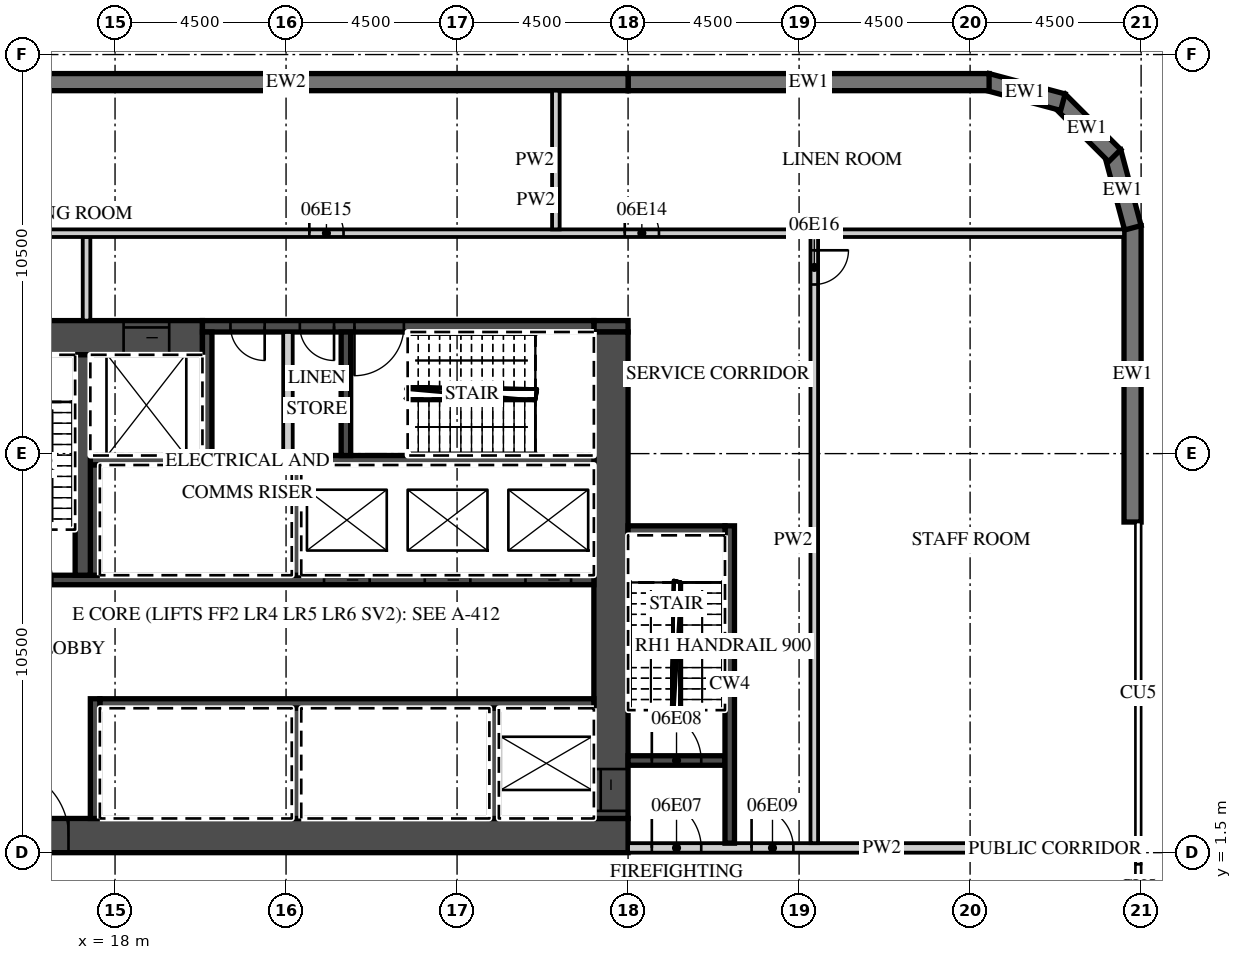
"""IFC4 building model, lengths in metres.
Left out: names, types, materials, properties, quantities, classifications, styles, units other than length and angle.
Written with IfcOpenShell. Run it as: python <this file> out.ifc"""

import sys

from ifc_helpers import new_model, si_unit, direction, frame, frame_2d, origin, place, context, subcontext, project, spatial, polyline, rectangle, outline, extrude, element, fill, save


model = new_model("IFC4")
c1 = context("Model", 3, precision=1e-05, world=origin(), true_north=direction((0.0, 1.0)))
c2 = subcontext(c1, "Body", "Model", "MODEL_VIEW")
j1 = project(units=[si_unit("LENGTHUNIT", "METRE"), si_unit("PLANEANGLEUNIT", "RADIAN")], contexts=[c1])
p1 = place(None, origin())
s1 = spatial("IfcSite", under=j1, at=p1, CompositionType="ELEMENT")
p2 = place(p1, origin())
s2 = spatial("IfcBuilding", under=s1, at=p2, CompositionType="ELEMENT")
p3 = place(p2, frame((0.0, 0.0, 38.0)))
s3 = spatial("IfcBuildingStorey", under=s2, at=p3, CompositionType="ELEMENT", Elevation=38.0)
p4 = place(p3, frame((44.775, 10.2, 0.0), z_axis=(0.0, 0.0, 1.0), x_axis=(0.0, 1.0, 0.0)))
e1 = element("IfcWall", 1, at=p4, inside=s3, PredefinedType="SOLIDWALL", context=c2, shape_type="SweptSolid", body=[
    extrude(rectangle(XDim=7.8, YDim=0.45, at=frame_2d((3.9, 0.0))), origin(), (0.0, 0.0, 1.0), 8.7),
])
p5 = place(p3, frame((44.783, 17.942, 0.0), z_axis=(0.0, 0.0, 1.0), x_axis=(-0.25881466832, 0.965926999034, 0.0)))
e2 = element("IfcWall", 2, at=p5, inside=s3, PredefinedType="SOLIDWALL", context=c2, shape_type="SweptSolid", body=[
    extrude(outline(polyline([(0.0, -0.225), (2.071, -0.225), (1.95, 0.225), (0.121, 0.225), (0.0, -0.225)])), origin(), (0.0, 0.0, 1.0), 8.7),
])
p6 = place(p3, frame((44.305, 19.841, 0.0), z_axis=(0.0, 0.0, 1.0), x_axis=(-0.707106781187, 0.707106781187, 0.0)))
e3 = element("IfcWall", 3, at=p6, inside=s3, PredefinedType="SOLIDWALL", context=c2, shape_type="SweptSolid", body=[
    extrude(outline(polyline([(0.0, -0.225), (2.071, -0.225), (1.95, 0.225), (0.121, 0.225), (0.0, -0.225)])), origin(), (0.0, 0.0, 1.0), 8.7),
])
p7 = place(p3, frame((42.942, 21.247, 0.0), z_axis=(0.0, 0.0, 1.0), x_axis=(-0.965926999034, 0.25881466832, 0.0)))
e4 = element("IfcWall", 4, at=p7, inside=s3, PredefinedType="SOLIDWALL", context=c2, shape_type="SweptSolid", body=[
    extrude(outline(polyline([(-0.0, -0.225), (2.07, -0.225), (1.95, 0.225), (0.12, 0.225), (-0.0, -0.225)])), origin(), (0.0, 0.0, 1.0), 8.7),
])
p8 = place(p3, frame((41.0, 21.775, 0.0), z_axis=(0.0, 0.0, 1.0), x_axis=(-1.0, 0.0, 0.0)))
e5 = element("IfcWall", 5, at=p8, inside=s3, PredefinedType="SOLIDWALL", context=c2, shape_type="SweptSolid", body=[
    extrude(rectangle(XDim=9.5, YDim=0.45, at=frame_2d((4.75, 0.0))), origin(), (0.0, 0.0, 1.0), 8.7),
])
p9 = place(p3, frame((31.5, 21.775, 0.0), z_axis=(0.0, 0.0, 1.0), x_axis=(-1.0, 0.0, 0.0)))
e6 = element("IfcWall", 6, at=p9, inside=s3, PredefinedType="SOLIDWALL", context=c2, shape_type="SweptSolid", body=[
    extrude(rectangle(XDim=18.0, YDim=0.45, at=frame_2d((9.0, 0.0))), origin(), (0.0, 0.0, 1.0), 8.7),
])
p10 = place(p3, frame((13.5, 1.95, 0.0), z_axis=(0.0, 0.0, 1.0), x_axis=(1.0, 0.0, 0.0)))
e7 = element("IfcWall", 7, at=p10, inside=s3, PredefinedType="SHEAR", context=c2, shape_type="SweptSolid", body=[
    extrude(rectangle(XDim=18.0, YDim=0.9, at=frame_2d((9.0, 0.0))), origin(), (0.0, 0.0, 1.0), 8.7),
])
p11 = place(p10, frame((1.475, 0.0, 0.0)))
e8 = element("IfcOpeningElement", 8, at=p11, cuts=e7, PredefinedType="OPENING", context=c2, shape_type="SweptSolid", body=[
    extrude(rectangle(XDim=1.8, YDim=2.1, at=frame_2d((0.9, 1.05))), frame((0.0, 0.46, 0.0), z_axis=(0.0, -1.0, 0.0), x_axis=(1.0, 0.0, 0.0)), (0.0, 0.0, 1.0), 0.92),
])
p12 = place(p3, frame((13.5, 15.05, 0.0), z_axis=(0.0, 0.0, 1.0), x_axis=(1.0, 0.0, 0.0)))
e9 = element("IfcWall", 9, at=p12, inside=s3, PredefinedType="SHEAR", context=c2, shape_type="SweptSolid", body=[
    extrude(rectangle(XDim=6.8, YDim=0.9, at=frame_2d((3.4, 0.0))), origin(), (0.0, 0.0, 1.0), 8.7),
])
p13 = place(p12, frame((4.725, 0.0, 0.0)))
e10 = element("IfcOpeningElement", 10, at=p13, cuts=e9, PredefinedType="OPENING", context=c2, shape_type="SweptSolid", body=[
    extrude(rectangle(XDim=1.2, YDim=2.1, at=frame_2d((0.6, 1.05))), frame((0.0, 0.46, 0.0), z_axis=(0.0, -1.0, 0.0), x_axis=(1.0, 0.0, 0.0)), (0.0, 0.0, 1.0), 0.92),
])
p14 = place(p3, frame((30.6, 15.35, 0.0), z_axis=(0.0, 0.0, 1.0), x_axis=(1.0, 0.0, 0.0)))
e11 = element("IfcWall", 11, at=p14, inside=s3, PredefinedType="SHEAR", context=c2, shape_type="SweptSolid", body=[
    extrude(rectangle(XDim=0.9, YDim=0.3, at=frame_2d((0.45, 0.0))), origin(), (0.0, 0.0, 1.0), 8.7),
])
p15 = place(p3, frame((20.3, 15.35, 0.0), z_axis=(0.0, 0.0, 1.0), x_axis=(1.0, 0.0, 0.0)))
e12 = element("IfcWall", 12, at=p15, inside=s3, PredefinedType="SHEAR", context=c2, shape_type="SweptSolid", body=[
    extrude(rectangle(XDim=10.3, YDim=0.3, at=frame_2d((5.15, 0.0))), origin(), (0.0, 0.0, 1.0), 8.7),
])
p16 = place(p15, frame((4.0, 0.0, 0.0)))
e13 = element("IfcOpeningElement", 13, at=p16, cuts=e12, PredefinedType="OPENING", context=c2, shape_type="SweptSolid", body=[
    extrude(rectangle(XDim=1.3, YDim=2.1, at=frame_2d((0.65, 1.05))), frame((0.0, 0.16, 0.0), z_axis=(0.0, -1.0, 0.0), x_axis=(1.0, 0.0, 0.0)), (0.0, 0.0, 1.0), 0.32),
])
p17 = place(p15, frame((2.562, 0.0, 0.0)))
e14 = element("IfcOpeningElement", 14, at=p17, cuts=e12, PredefinedType="OPENING", context=c2, shape_type="SweptSolid", body=[
    extrude(rectangle(XDim=0.9, YDim=2.1, at=frame_2d((0.45, 1.05))), frame((0.0, 0.16, 0.0), z_axis=(0.0, -1.0, 0.0), x_axis=(1.0, 0.0, 0.0)), (0.0, 0.0, 1.0), 0.32),
])
p18 = place(p15, frame((0.738, 0.0, 0.0)))
e15 = element("IfcOpeningElement", 15, at=p18, cuts=e12, PredefinedType="OPENING", context=c2, shape_type="SweptSolid", body=[
    extrude(rectangle(XDim=0.9, YDim=2.1, at=frame_2d((0.45, 1.05))), frame((0.0, 0.16, 0.0), z_axis=(0.0, -1.0, 0.0), x_axis=(1.0, 0.0, 0.0)), (0.0, 0.0, 1.0), 0.32),
])
p19 = place(p3, frame((31.05, 2.4, 0.0), z_axis=(0.0, 0.0, 1.0), x_axis=(0.0, 1.0, 0.0)))
e16 = element("IfcWall", 16, at=p19, inside=s3, PredefinedType="SHEAR", context=c2, shape_type="SweptSolid", body=[
    extrude(rectangle(XDim=12.8, YDim=0.9, at=frame_2d((6.4, 0.0))), origin(), (0.0, 0.0, 1.0), 8.7),
])
p20 = place(p19, frame((0.2, 0.0, 0.0)))
e17 = element("IfcOpeningElement", 17, at=p20, cuts=e16, PredefinedType="OPENING", context=c2, shape_type="SweptSolid", body=[
    extrude(rectangle(XDim=1.1, YDim=2.1, at=frame_2d((0.55, 1.05))), frame((0.0, 0.46, 0.0), z_axis=(0.0, -1.0, 0.0), x_axis=(1.0, 0.0, 0.0)), (0.0, 0.0, 1.0), 0.92),
])
p21 = place(p3, frame((17.6, 5.425, 0.0), z_axis=(0.0, 0.0, 1.0), x_axis=(1.0, 0.0, 0.0)))
e18 = element("IfcWall", 18, at=p21, inside=s3, PredefinedType="SHEAR", context=c2, shape_type="SweptSolid", body=[
    extrude(rectangle(XDim=13.0, YDim=0.25, at=frame_2d((6.5, 0.0))), origin(), (0.0, 0.0, 1.0), 8.7),
])
p22 = place(p3, frame((17.475, 2.4, 0.0), z_axis=(0.0, 0.0, 1.0), x_axis=(0.0, 1.0, 0.0)))
e19 = element("IfcWall", 19, at=p22, inside=s3, PredefinedType="SHEAR", context=c2, shape_type="SweptSolid", body=[
    extrude(rectangle(XDim=3.15, YDim=0.25, at=frame_2d((1.575, 0.0))), origin(), (0.0, 0.0, 1.0), 8.7),
])
for number, where, z_axis, x_axis in (
    (20, (27.975, 2.4, 0.0), (0.0, 0.0, 1.0), (0.0, 1.0, 0.0)),
    (21, (22.775, 2.4, 0.0), (0.0, 0.0, 1.0), (0.0, 1.0, 0.0)),
):
    element("IfcWall", number, at=place(p3, frame(where, z_axis=z_axis, x_axis=x_axis)), inside=s3, PredefinedType="SHEAR", context=c2, shape_type="SweptSolid", body=[
        extrude(rectangle(XDim=2.9, YDim=0.25, at=frame_2d((1.45, 0.0))), origin(), (0.0, 0.0, 1.0), 8.7),
    ])
p23 = place(p3, frame((14.4, 8.675, 0.0), z_axis=(0.0, 0.0, 1.0), x_axis=(1.0, 0.0, 0.0)))
e22 = element("IfcWall", 22, at=p23, inside=s3, PredefinedType="SHEAR", context=c2, shape_type="SweptSolid", body=[
    extrude(rectangle(XDim=16.2, YDim=0.25, at=frame_2d((8.1, 0.0))), origin(), (0.0, 0.0, 1.0), 8.7),
])
p24 = place(p23, frame((14.4, 0.0, 0.0)))
e23 = element("IfcOpeningElement", 23, at=p24, cuts=e22, PredefinedType="OPENING", context=c2, shape_type="SweptSolid", body=[
    extrude(rectangle(XDim=1.2, YDim=2.1, at=frame_2d((0.6, 1.05))), frame((0.0, 0.135, 0.0), z_axis=(0.0, -1.0, 0.0), x_axis=(1.0, 0.0, 0.0)), (0.0, 0.0, 1.0), 0.27),
])
p25 = place(p23, frame((11.75, 0.0, 0.0)))
e24 = element("IfcOpeningElement", 24, at=p25, cuts=e22, PredefinedType="OPENING", context=c2, shape_type="SweptSolid", body=[
    extrude(rectangle(XDim=1.2, YDim=2.1, at=frame_2d((0.6, 1.05))), frame((0.0, 0.135, 0.0), z_axis=(0.0, -1.0, 0.0), x_axis=(1.0, 0.0, 0.0)), (0.0, 0.0, 1.0), 0.27),
])
p26 = place(p23, frame((9.1, 0.0, 0.0)))
e25 = element("IfcOpeningElement", 25, at=p26, cuts=e22, PredefinedType="OPENING", context=c2, shape_type="SweptSolid", body=[
    extrude(rectangle(XDim=1.2, YDim=2.1, at=frame_2d((0.6, 1.05))), frame((0.0, 0.135, 0.0), z_axis=(0.0, -1.0, 0.0), x_axis=(1.0, 0.0, 0.0)), (0.0, 0.0, 1.0), 0.27),
])
p27 = place(p23, frame((0.65, 0.0, 0.0)))
e26 = element("IfcOpeningElement", 26, at=p27, cuts=e22, PredefinedType="OPENING", context=c2, shape_type="SweptSolid", body=[
    extrude(rectangle(XDim=1.3, YDim=2.1, at=frame_2d((0.65, 1.05))), frame((0.0, 0.135, 0.0), z_axis=(0.0, -1.0, 0.0), x_axis=(1.0, 0.0, 0.0)), (0.0, 0.0, 1.0), 0.27),
])
p28 = place(p3, frame((17.35, 11.825, 0.0), z_axis=(0.0, 0.0, 1.0), x_axis=(1.0, 0.0, 0.0)))
e27 = element("IfcWall", 27, at=p28, inside=s3, PredefinedType="SHEAR", context=c2, shape_type="SweptSolid", body=[
    extrude(rectangle(XDim=13.25, YDim=0.25, at=frame_2d((6.625, 0.0))), origin(), (0.0, 0.0, 1.0), 8.7),
])
for number, where, z_axis, x_axis in (
    (28, (17.475, 8.8, 0.0), (0.0, 0.0, 1.0), (0.0, 1.0, 0.0)),
    (29, (22.775, 8.8, 0.0), (0.0, 0.0, 1.0), (0.0, 1.0, 0.0)),
):
    element("IfcWall", number, at=place(p3, frame(where, z_axis=z_axis, x_axis=x_axis)), inside=s3, PredefinedType="SHEAR", context=c2, shape_type="SweptSolid", body=[
        extrude(rectangle(XDim=2.9, YDim=0.25, at=frame_2d((1.45, 0.0))), origin(), (0.0, 0.0, 1.0), 8.7),
    ])
p29 = place(p3, frame((17.15, 8.8, 0.0), z_axis=(0.0, 0.0, 1.0), x_axis=(0.0, 1.0, 0.0)))
e30 = element("IfcWall", 30, at=p29, inside=s3, PredefinedType="SHEAR", context=c2, shape_type="SweptSolid", body=[
    extrude(rectangle(XDim=5.8, YDim=0.4, at=frame_2d((2.9, 0.0))), origin(), (0.0, 0.0, 1.0), 8.7),
])
for number, where, z_axis, x_axis in (
    (31, (20.425, 11.95, 0.0), (0.0, 0.0, 1.0), (0.0, 1.0, 0.0)),
    (32, (24.075, 11.95, 0.0), (0.0, 0.0, 1.0), (0.0, 1.0, 0.0)),
):
    element("IfcWall", number, at=place(p3, frame(where, z_axis=z_axis, x_axis=x_axis)), inside=s3, PredefinedType="SHEAR", context=c2, shape_type="SweptSolid", body=[
        extrude(rectangle(XDim=3.25, YDim=0.25, at=frame_2d((1.625, 0.0))), origin(), (0.0, 0.0, 1.0), 8.7),
    ])
p30 = place(p3, frame((22.55, 11.95, 0.0), z_axis=(0.0, 0.0, 1.0), x_axis=(0.0, 1.0, 0.0)))
e33 = element("IfcWall", 33, at=p30, inside=s3, PredefinedType="PARTITIONING", context=c2, shape_type="SweptSolid", body=[
    extrude(rectangle(XDim=3.25, YDim=0.25, at=frame_2d((1.625, 0.0))), origin(), (0.0, 0.0, 1.0), 8.7),
])
p31 = place(p3, frame((31.5, 1.625, 0.0), z_axis=(0.0, 0.0, 1.0), x_axis=(1.0, 0.0, 0.0)))
e34 = element("IfcWall", 34, at=p31, inside=s3, PredefinedType="PARTITIONING", context=c2, shape_type="SweptSolid", body=[
    extrude(rectangle(XDim=13.35, YDim=0.25, at=frame_2d((6.675, 0.0))), origin(), (0.0, 0.0, 1.0), 8.7),
])
p32 = place(p31, frame((0.625, 0.0, 0.0)))
e35 = element("IfcOpeningElement", 35, at=p32, cuts=e34, PredefinedType="OPENING", context=c2, shape_type="SweptSolid", body=[
    extrude(rectangle(XDim=1.3, YDim=2.1, at=frame_2d((0.65, 1.05))), frame((0.0, 0.135, 0.0), z_axis=(0.0, -1.0, 0.0), x_axis=(1.0, 0.0, 0.0)), (0.0, 0.0, 1.0), 0.27),
])
p33 = place(p31, frame((3.25, 0.0, 0.0)))
e36 = element("IfcOpeningElement", 36, at=p33, cuts=e34, PredefinedType="OPENING", context=c2, shape_type="SweptSolid", body=[
    extrude(rectangle(XDim=1.1, YDim=2.1, at=frame_2d((0.55, 1.05))), frame((0.0, 0.135, 0.0), z_axis=(0.0, -1.0, 0.0), x_axis=(1.0, 0.0, 0.0)), (0.0, 0.0, 1.0), 0.27),
])
p34 = place(p3, frame((31.5, 3.925, 0.0), z_axis=(0.0, 0.0, 1.0), x_axis=(1.0, 0.0, 0.0)))
e37 = element("IfcWall", 37, at=p34, inside=s3, PredefinedType="SHEAR", context=c2, shape_type="SweptSolid", body=[
    extrude(rectangle(XDim=2.55, YDim=0.25, at=frame_2d((1.275, 0.0))), origin(), (0.0, 0.0, 1.0), 8.7),
])
p35 = place(p34, frame((0.625, 0.0, 0.0)))
e38 = element("IfcOpeningElement", 38, at=p35, cuts=e37, PredefinedType="OPENING", context=c2, shape_type="SweptSolid", body=[
    extrude(rectangle(XDim=1.3, YDim=2.1, at=frame_2d((0.65, 1.05))), frame((0.0, 0.135, 0.0), z_axis=(0.0, -1.0, 0.0), x_axis=(1.0, 0.0, 0.0)), (0.0, 0.0, 1.0), 0.27),
])
p36 = place(p3, frame((34.175, 1.75, 0.0), z_axis=(0.0, 0.0, 1.0), x_axis=(0.0, 1.0, 0.0)))
e39 = element("IfcWall", 39, at=p36, inside=s3, PredefinedType="SHEAR", context=c2, shape_type="SweptSolid", body=[
    extrude(rectangle(XDim=8.35, YDim=0.25, at=frame_2d((4.175, 0.0))), origin(), (0.0, 0.0, 1.0), 8.7),
])
p37 = place(p3, frame((31.5, 9.975, 0.0), z_axis=(0.0, 0.0, 1.0), x_axis=(1.0, 0.0, 0.0)))
e40 = element("IfcWall", 40, at=p37, inside=s3, PredefinedType="SHEAR", context=c2, shape_type="SweptSolid", body=[
    extrude(rectangle(XDim=2.55, YDim=0.25, at=frame_2d((1.275, 0.0))), origin(), (0.0, 0.0, 1.0), 8.7),
])
p38 = place(p3, frame((17.25, 15.5, 0.0), z_axis=(0.0, 0.0, 1.0), x_axis=(0.0, 1.0, 0.0)))
e41 = element("IfcWall", 41, at=p38, inside=s3, PredefinedType="PARTITIONING", context=c2, shape_type="SweptSolid", body=[
    extrude(rectangle(XDim=2.2, YDim=0.2, at=frame_2d((1.1, 0.0))), origin(), (0.0, 0.0, 1.0), 8.7),
])
p39 = place(p3, frame((36.4, 1.75, 0.0), z_axis=(0.0, 0.0, 1.0), x_axis=(0.0, 1.0, 0.0)))
e42 = element("IfcWall", 42, at=p39, inside=s3, PredefinedType="PARTITIONING", context=c2, shape_type="SweptSolid", body=[
    extrude(rectangle(XDim=15.95, YDim=0.2, at=frame_2d((7.975, 0.0))), origin(), (0.0, 0.0, 1.0), 8.7),
])
p40 = place(p39, frame((14.7, 0.0, 0.0)))
e43 = element("IfcOpeningElement", 43, at=p40, cuts=e42, PredefinedType="OPENING", context=c2, shape_type="SweptSolid", body=[
    extrude(rectangle(XDim=0.9, YDim=2.1, at=frame_2d((0.45, 1.05))), frame((0.0, 0.11, 0.0), z_axis=(0.0, -1.0, 0.0), x_axis=(1.0, 0.0, 0.0)), (0.0, 0.0, 1.0), 0.22),
])
p41 = place(p3, frame((13.6, 17.8, 0.0), z_axis=(0.0, 0.0, 1.0), x_axis=(1.0, 0.0, 0.0)))
e44 = element("IfcWall", 44, at=p41, inside=s3, PredefinedType="PARTITIONING", context=c2, shape_type="SweptSolid", body=[
    extrude(rectangle(XDim=30.95, YDim=0.2, at=frame_2d((15.475, 0.0))), origin(), (0.0, 0.0, 1.0), 8.7),
])
p42 = place(p41, frame((17.812, 0.0, 0.0)))
e45 = element("IfcOpeningElement", 45, at=p42, cuts=e44, PredefinedType="OPENING", context=c2, shape_type="SweptSolid", body=[
    extrude(rectangle(XDim=0.9, YDim=2.1, at=frame_2d((0.45, 1.05))), frame((0.0, 0.11, 0.0), z_axis=(0.0, -1.0, 0.0), x_axis=(1.0, 0.0, 0.0)), (0.0, 0.0, 1.0), 0.22),
])
p43 = place(p41, frame((9.512, 0.0, 0.0)))
e46 = element("IfcOpeningElement", 46, at=p43, cuts=e44, PredefinedType="OPENING", context=c2, shape_type="SweptSolid", body=[
    extrude(rectangle(XDim=0.9, YDim=2.1, at=frame_2d((0.45, 1.05))), frame((0.0, 0.11, 0.0), z_axis=(0.0, -1.0, 0.0), x_axis=(1.0, 0.0, 0.0)), (0.0, 0.0, 1.0), 0.22),
])
p44 = place(p3, frame((29.6, 17.9, 0.0), z_axis=(0.0, 0.0, 1.0), x_axis=(0.0, 1.0, 0.0)))
e47 = element("IfcWall", 47, at=p44, inside=s3, PredefinedType="PARTITIONING", context=c2, shape_type="SweptSolid", body=[
    extrude(rectangle(XDim=3.65, YDim=0.2, at=frame_2d((1.825, 0.0))), origin(), (0.0, 0.0, 1.0), 8.7),
])
p45 = place(p24, origin())
e48 = element("IfcDoor", 48, at=p45, inside=s3, OperationType="SLIDING_TO_LEFT", PredefinedType="DOOR", context=c2, shape_type="SweptSolid", body=[
    extrude(rectangle(XDim=1.2, YDim=2.1, at=frame_2d((0.6, 1.05))), frame((0.0, 0.025, 0.0), z_axis=(0.0, -1.0, 0.0), x_axis=(1.0, 0.0, 0.0)), (0.0, 0.0, 1.0), 0.05),
])
fill(e23, e48)
p46 = place(p25, origin())
e49 = element("IfcDoor", 49, at=p46, inside=s3, OperationType="SLIDING_TO_RIGHT", PredefinedType="DOOR", context=c2, shape_type="SweptSolid", body=[
    extrude(rectangle(XDim=1.2, YDim=2.1, at=frame_2d((0.6, 1.05))), frame((0.0, 0.025, 0.0), z_axis=(0.0, -1.0, 0.0), x_axis=(1.0, 0.0, 0.0)), (0.0, 0.0, 1.0), 0.05),
])
fill(e24, e49)
p47 = place(p26, origin())
e50 = element("IfcDoor", 50, at=p47, inside=s3, OperationType="SLIDING_TO_RIGHT", PredefinedType="DOOR", context=c2, shape_type="SweptSolid", body=[
    extrude(rectangle(XDim=1.2, YDim=2.1, at=frame_2d((0.6, 1.05))), frame((0.0, 0.025, 0.0), z_axis=(0.0, -1.0, 0.0), x_axis=(1.0, 0.0, 0.0)), (0.0, 0.0, 1.0), 0.05),
])
fill(e25, e50)
p48 = place(p13, origin())
e51 = element("IfcDoor", 51, at=p48, inside=s3, OperationType="SLIDING_TO_LEFT", PredefinedType="DOOR", context=c2, shape_type="SweptSolid", body=[
    extrude(rectangle(XDim=1.2, YDim=2.1, at=frame_2d((0.6, 1.05))), frame((0.0, 0.025, 0.0), z_axis=(0.0, -1.0, 0.0), x_axis=(1.0, 0.0, 0.0)), (0.0, 0.0, 1.0), 0.05),
])
fill(e10, e51)
p49 = place(p20, origin())
e52 = element("IfcDoor", 52, at=p49, inside=s3, OperationType="SLIDING_TO_LEFT", PredefinedType="DOOR", context=c2, shape_type="SweptSolid", body=[
    extrude(rectangle(XDim=1.1, YDim=2.1, at=frame_2d((0.55, 1.05))), frame((0.0, 0.025, 0.0), z_axis=(0.0, -1.0, 0.0), x_axis=(1.0, 0.0, 0.0)), (0.0, 0.0, 1.0), 0.05),
])
fill(e17, e52)
p50 = place(p11, origin())
e53 = element("IfcDoor", 53, at=p50, inside=s3, OperationType="DOUBLE_DOOR_DOUBLE_SWING", PredefinedType="DOOR", context=c2, shape_type="SweptSolid", body=[
    extrude(rectangle(XDim=1.8, YDim=2.1, at=frame_2d((0.9, 1.05))), frame((0.0, 0.025, 0.0), z_axis=(0.0, -1.0, 0.0), x_axis=(1.0, 0.0, 0.0)), (0.0, 0.0, 1.0), 0.05),
])
fill(e8, e53)
p51 = place(p32, origin())
e54 = element("IfcDoor", 54, at=p51, inside=s3, OperationType="SINGLE_SWING_LEFT", PredefinedType="DOOR", context=c2, shape_type="SweptSolid", body=[
    extrude(rectangle(XDim=1.3, YDim=2.1, at=frame_2d((0.65, 1.05))), frame((0.0, 0.025, 0.0), z_axis=(0.0, -1.0, 0.0), x_axis=(1.0, 0.0, 0.0)), (0.0, 0.0, 1.0), 0.05),
])
fill(e35, e54)
p52 = place(p35, origin())
e55 = element("IfcDoor", 55, at=p52, inside=s3, OperationType="SINGLE_SWING_LEFT", PredefinedType="DOOR", context=c2, shape_type="SweptSolid", body=[
    extrude(rectangle(XDim=1.3, YDim=2.1, at=frame_2d((0.65, 1.05))), frame((0.0, 0.025, 0.0), z_axis=(0.0, -1.0, 0.0), x_axis=(1.0, 0.0, 0.0)), (0.0, 0.0, 1.0), 0.05),
])
fill(e38, e55)
p53 = place(p33, origin())
e56 = element("IfcDoor", 56, at=p53, inside=s3, OperationType="SINGLE_SWING_LEFT", PredefinedType="DOOR", context=c2, shape_type="SweptSolid", body=[
    extrude(rectangle(XDim=1.1, YDim=2.1, at=frame_2d((0.55, 1.05))), frame((0.0, 0.025, 0.0), z_axis=(0.0, -1.0, 0.0), x_axis=(1.0, 0.0, 0.0)), (0.0, 0.0, 1.0), 0.05),
])
fill(e36, e56)
p54 = place(p16, origin())
e57 = element("IfcDoor", 57, at=p54, inside=s3, OperationType="SINGLE_SWING_LEFT", PredefinedType="DOOR", context=c2, shape_type="SweptSolid", body=[
    extrude(rectangle(XDim=1.3, YDim=2.1, at=frame_2d((0.65, 1.05))), frame((0.0, 0.025, 0.0), z_axis=(0.0, -1.0, 0.0), x_axis=(1.0, 0.0, 0.0)), (0.0, 0.0, 1.0), 0.05),
])
fill(e13, e57)
p55 = place(p17, origin())
e58 = element("IfcDoor", 58, at=p55, inside=s3, OperationType="SINGLE_SWING_RIGHT", PredefinedType="DOOR", context=c2, shape_type="SweptSolid", body=[
    extrude(rectangle(XDim=0.9, YDim=2.1, at=frame_2d((0.45, 1.05))), frame((0.0, 0.025, 0.0), z_axis=(0.0, -1.0, 0.0), x_axis=(1.0, 0.0, 0.0)), (0.0, 0.0, 1.0), 0.05),
])
fill(e14, e58)
p56 = place(p18, origin())
e59 = element("IfcDoor", 59, at=p56, inside=s3, OperationType="SINGLE_SWING_RIGHT", PredefinedType="DOOR", context=c2, shape_type="SweptSolid", body=[
    extrude(rectangle(XDim=0.9, YDim=2.1, at=frame_2d((0.45, 1.05))), frame((0.0, 0.025, 0.0), z_axis=(0.0, -1.0, 0.0), x_axis=(1.0, 0.0, 0.0)), (0.0, 0.0, 1.0), 0.05),
])
fill(e15, e59)
p57 = place(p42, origin())
e60 = element("IfcDoor", 60, at=p57, inside=s3, OperationType="SINGLE_SWING_LEFT", PredefinedType="DOOR", context=c2, shape_type="SweptSolid", body=[
    extrude(rectangle(XDim=0.9, YDim=2.1, at=frame_2d((0.45, 1.05))), frame((0.0, 0.025, 0.0), z_axis=(0.0, -1.0, 0.0), x_axis=(1.0, 0.0, 0.0)), (0.0, 0.0, 1.0), 0.05),
])
fill(e45, e60)
p58 = place(p43, origin())
e61 = element("IfcDoor", 61, at=p58, inside=s3, OperationType="SINGLE_SWING_LEFT", PredefinedType="DOOR", context=c2, shape_type="SweptSolid", body=[
    extrude(rectangle(XDim=0.9, YDim=2.1, at=frame_2d((0.45, 1.05))), frame((0.0, 0.025, 0.0), z_axis=(0.0, -1.0, 0.0), x_axis=(1.0, 0.0, 0.0)), (0.0, 0.0, 1.0), 0.05),
])
fill(e46, e61)
p59 = place(p40, origin())
e62 = element("IfcDoor", 62, at=p59, inside=s3, OperationType="SINGLE_SWING_RIGHT", PredefinedType="DOOR", context=c2, shape_type="SweptSolid", body=[
    extrude(rectangle(XDim=0.9, YDim=2.1, at=frame_2d((0.45, 1.05))), frame((0.0, 0.025, 0.0), z_axis=(0.0, -1.0, 0.0), x_axis=(1.0, 0.0, 0.0)), (0.0, 0.0, 1.0), 0.05),
])
fill(e43, e62)
save(model, sys.argv[1])
